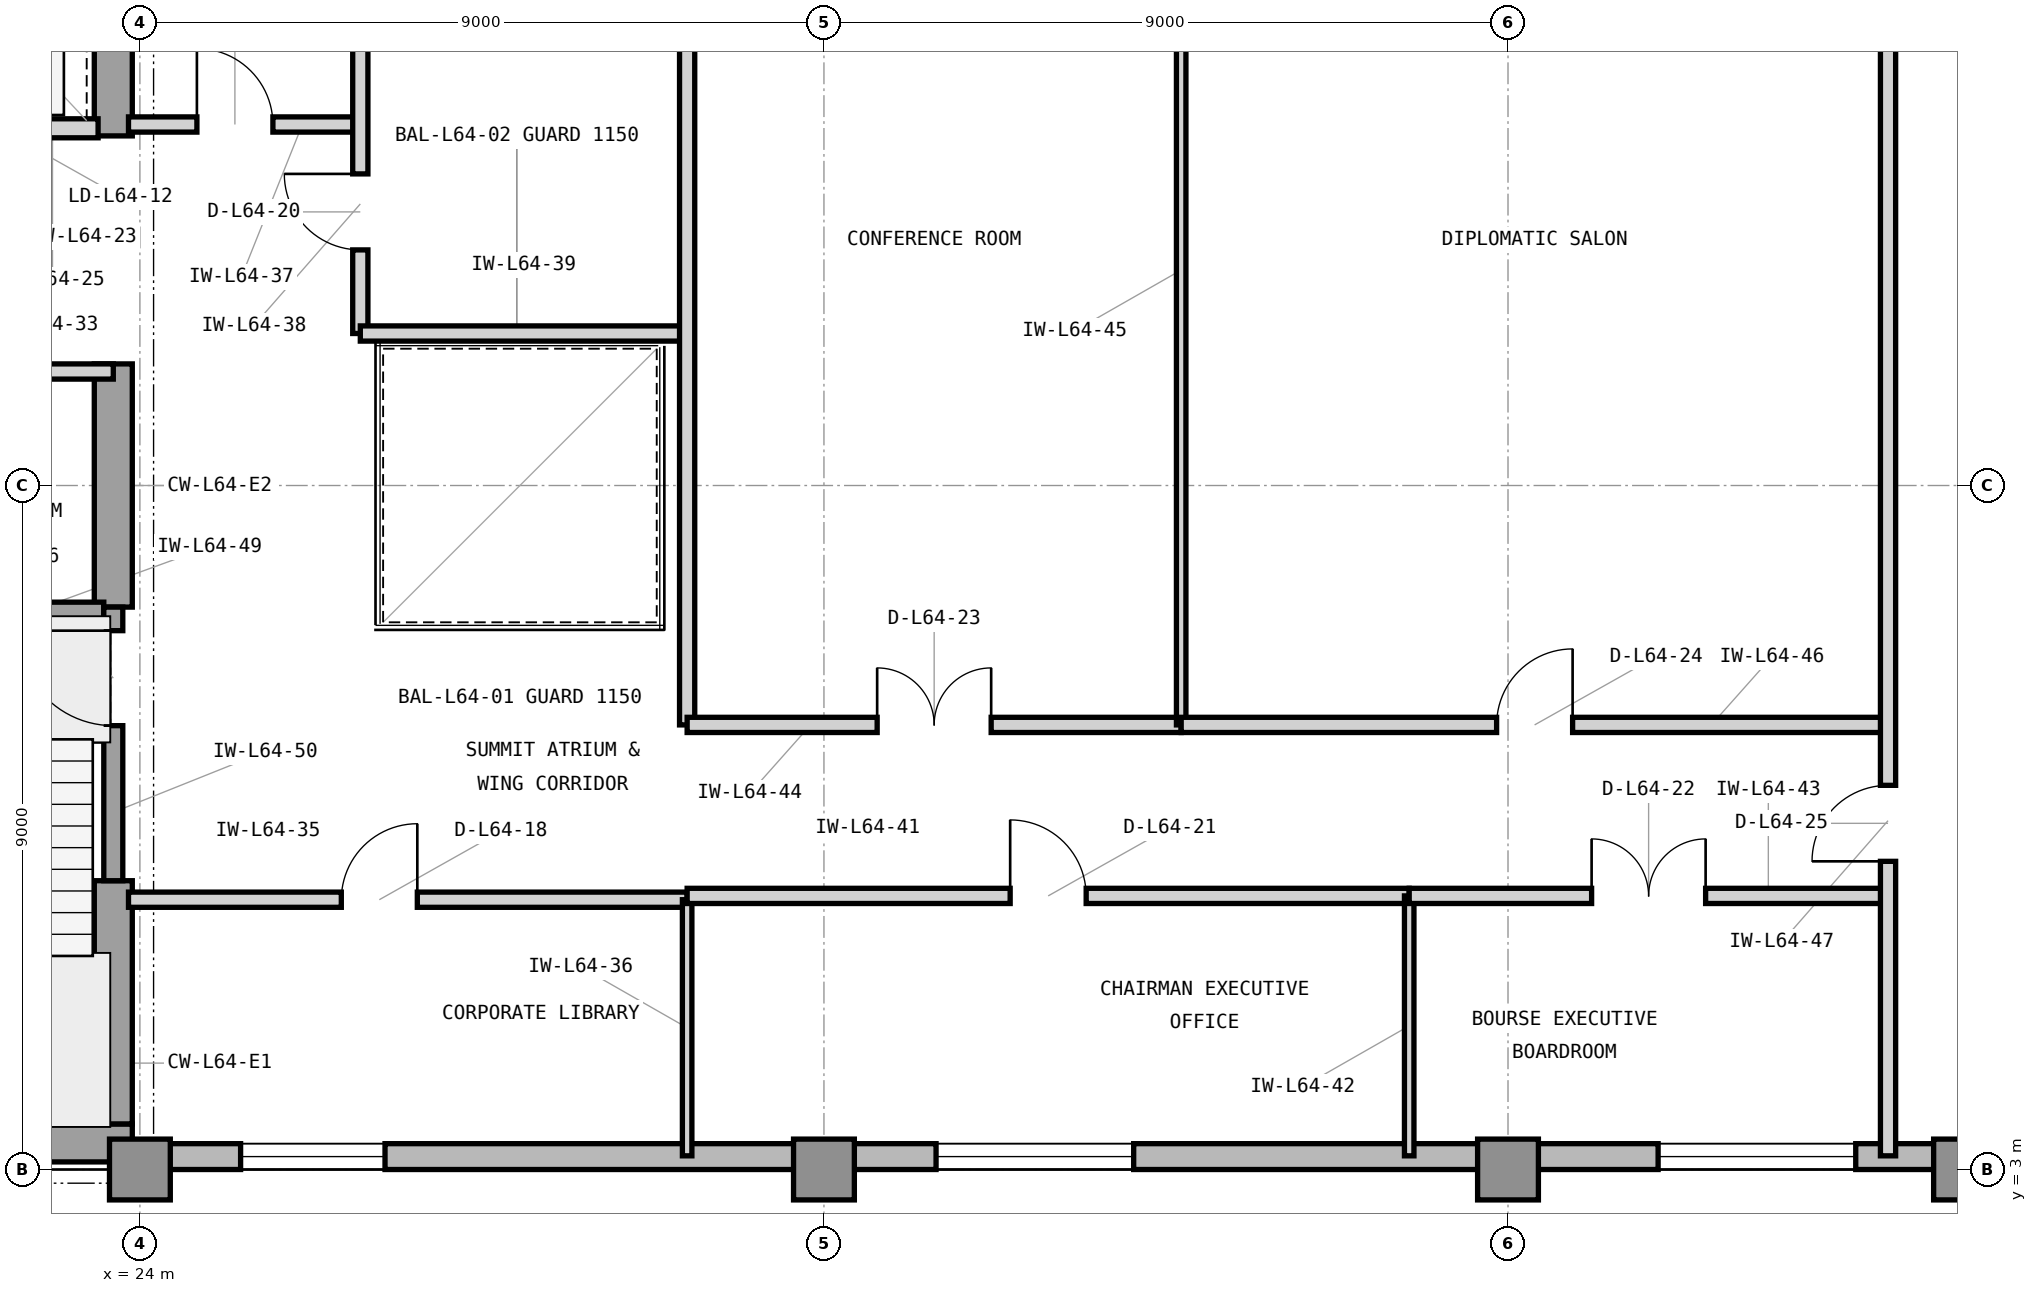
"""IFC4 building model, lengths in metres.
Left out: names, types, materials, properties, quantities, classifications, styles, units other than length and angle.
Written with IfcOpenShell. Run it as: python <this file> out.ifc"""

import sys

from ifc_helpers import new_model, si_unit, direction, frame, frame_2d, origin, origin_2d, place, context, subcontext, project, spatial, rectangle, extrude, element, fill, save


model = new_model("IFC4")
c1 = context("Model", 3, precision=1e-05, world=origin(), true_north=direction((0.0, 1.0)))
c2 = subcontext(c1, "Body", "Model", "MODEL_VIEW")
j1 = project(units=[si_unit("LENGTHUNIT", "METRE"), si_unit("PLANEANGLEUNIT", "RADIAN")], contexts=[c1])
p1 = place(None, origin())
s1 = spatial("IfcSite", under=j1, at=p1, CompositionType="ELEMENT")
p2 = place(p1, origin())
s2 = spatial("IfcBuilding", under=s1, at=p2, CompositionType="ELEMENT")
p3 = place(p2, frame((0.0, 0.0, 262.5)))
s3 = spatial("IfcBuildingStorey", under=s2, at=p3, CompositionType="ELEMENT", Elevation=262.5)
p4 = place(p3, frame((7.475, 3.35, 0.0), z_axis=(0.0, 0.0, 1.0), x_axis=(1.0, 0.0, 0.0)))
e1 = element("IfcWall", 1, at=p4, inside=s3, PredefinedType="SHEAR", context=c2, shape_type="SweptSolid", body=[
    extrude(rectangle(XDim=16.425, YDim=0.5, at=frame_2d((8.212, 0.0))), origin(), (0.0, 0.0, 1.0), 3.9),
])
p5 = place(p3, frame((23.65, 3.6, 0.0), z_axis=(0.0, 0.0, 1.0), x_axis=(0.0, 1.0, 0.0)))
e2 = element("IfcWall", 2, at=p5, inside=s3, PredefinedType="SHEAR", context=c2, shape_type="SweptSolid", body=[
    extrude(rectangle(XDim=3.2, YDim=0.5, at=frame_2d((1.6, 0.0))), origin(), (0.0, 0.0, 1.0), 3.9),
])
p6 = place(p3, frame((23.65, 10.4, 0.0), z_axis=(0.0, 0.0, 1.0), x_axis=(0.0, 1.0, 0.0)))
e3 = element("IfcWall", 3, at=p6, inside=s3, PredefinedType="SHEAR", context=c2, shape_type="SweptSolid", body=[
    extrude(rectangle(XDim=3.2, YDim=0.5, at=frame_2d((1.6, 0.0))), origin(), (0.0, 0.0, 1.0), 3.9),
])
p7 = place(p3, frame((23.65, 16.6, 0.0), z_axis=(0.0, 0.0, 1.0), x_axis=(0.0, 1.0, 0.0)))
e4 = element("IfcWall", 4, at=p7, inside=s3, PredefinedType="SHEAR", context=c2, shape_type="SweptSolid", body=[
    extrude(rectangle(XDim=4.05, YDim=0.5, at=frame_2d((2.025, 0.0))), origin(), (0.0, 0.0, 1.0), 3.9),
])
for number, where, z_axis, x_axis in (
    (5, (24.0, 3.0, 0.0), (0.0, 0.0, 1.0), (1.0, 0.0, 0.0)),
    (6, (33.0, 3.0, 0.0), (0.0, 0.0, 1.0), (1.0, 0.0, 0.0)),
    (7, (42.0, 3.0, 0.0), (0.0, 0.0, 1.0), (1.0, 0.0, 0.0)),
    (8, (48.0, 3.0, 0.0), (0.0, 0.0, 1.0), (1.0, 0.0, 0.0)),
):
    element("IfcColumn", number, at=place(p3, frame(where, z_axis=z_axis, x_axis=x_axis)), inside=s3, PredefinedType="COLUMN", context=c2, shape_type="SweptSolid", body=[
        extrude(rectangle(XDim=0.8, YDim=0.8, at=origin_2d()), origin(), (0.0, 0.0, 1.0), 3.9),
    ])
p8 = place(p3, frame((23.9, 3.17, 0.0), z_axis=(0.0, 0.0, 1.0), x_axis=(1.0, 0.0, 0.0)))
e9 = element("IfcWall", 9, at=p8, inside=s3, PredefinedType="STANDARD", context=c2, shape_type="SweptSolid", body=[
    extrude(rectangle(XDim=28.5, YDim=0.34, at=frame_2d((14.25, 0.0))), origin(), (0.0, 0.0, 1.0), 3.715),
])
p9 = place(p8, frame((1.425, 0.0, 0.8)))
e10 = element("IfcOpeningElement", 10, at=p9, cuts=e9, PredefinedType="OPENING", context=c2, shape_type="SweptSolid", body=[
    extrude(rectangle(XDim=1.9, YDim=2.35, at=frame_2d((0.95, 1.175))), frame((0.0, 0.18, 0.0), z_axis=(0.0, -1.0, 0.0), x_axis=(1.0, 0.0, 0.0)), (0.0, 0.0, 1.0), 0.36),
])
p10 = place(p8, frame((10.575, 0.0, 0.8)))
e11 = element("IfcOpeningElement", 11, at=p10, cuts=e9, PredefinedType="OPENING", context=c2, shape_type="SweptSolid", body=[
    extrude(rectangle(XDim=2.6, YDim=2.35, at=frame_2d((1.3, 1.175))), frame((0.0, 0.18, 0.0), z_axis=(0.0, -1.0, 0.0), x_axis=(1.0, 0.0, 0.0)), (0.0, 0.0, 1.0), 0.36),
])
p11 = place(p8, frame((20.075, 0.0, 0.8)))
e12 = element("IfcOpeningElement", 12, at=p11, cuts=e9, PredefinedType="OPENING", context=c2, shape_type="SweptSolid", body=[
    extrude(rectangle(XDim=2.6, YDim=2.35, at=frame_2d((1.3, 1.175))), frame((0.0, 0.18, 0.0), z_axis=(0.0, -1.0, 0.0), x_axis=(1.0, 0.0, 0.0)), (0.0, 0.0, 1.0), 0.36),
])
p12 = place(p3, frame((21.05, 16.7, 0.0), z_axis=(0.0, 0.0, 1.0), x_axis=(1.0, 0.0, 0.0)))
e13 = element("IfcWall", 13, at=p12, inside=s3, PredefinedType="PARTITIONING", context=c2, shape_type="SweptSolid", body=[
    extrude(rectangle(XDim=2.4, YDim=0.25, at=frame_2d((1.2, 0.0))), origin(), (0.0, 0.0, 1.0), 3.088),
])
p13 = place(p12, frame((0.52, 0.0, 0.0)))
e14 = element("IfcOpeningElement", 14, at=p13, cuts=e13, PredefinedType="OPENING", context=c2, shape_type="SweptSolid", body=[
    extrude(rectangle(XDim=1.15, YDim=2.25, at=frame_2d((0.575, 1.125))), frame((0.0, 0.135, 0.0), z_axis=(0.0, -1.0, 0.0), x_axis=(1.0, 0.0, 0.0)), (0.0, 0.0, 1.0), 0.27),
])
p14 = place(p3, frame((18.5, 13.5, 0.0), z_axis=(0.0, 0.0, 1.0), x_axis=(1.0, 0.0, 0.0)))
e15 = element("IfcWall", 15, at=p14, inside=s3, PredefinedType="PARTITIONING", context=c2, shape_type="SweptSolid", body=[
    extrude(rectangle(XDim=5.15, YDim=0.2, at=frame_2d((2.575, 0.0))), origin(), (0.0, 0.0, 1.0), 3.088),
])
p15 = place(p14, frame((2.1, 0.0, 0.0)))
e16 = element("IfcOpeningElement", 16, at=p15, cuts=e15, PredefinedType="OPENING", context=c2, shape_type="SweptSolid", body=[
    extrude(rectangle(XDim=0.95, YDim=2.1, at=frame_2d((0.475, 1.05))), frame((0.0, 0.11, 0.0), z_axis=(0.0, -1.0, 0.0), x_axis=(1.0, 0.0, 0.0)), (0.0, 0.0, 1.0), 0.22),
])
p16 = place(p3, frame((23.85, 6.55, 0.0), z_axis=(0.0, 0.0, 1.0), x_axis=(1.0, 0.0, 0.0)))
e17 = element("IfcWall", 17, at=p16, inside=s3, PredefinedType="PARTITIONING", context=c2, shape_type="SweptSolid", body=[
    extrude(rectangle(XDim=7.35, YDim=0.2, at=frame_2d((3.675, 0.0))), origin(), (0.0, 0.0, 1.0), 3.705),
])
p17 = place(p16, frame((2.8, 0.0, 0.0)))
e18 = element("IfcOpeningElement", 18, at=p17, cuts=e17, PredefinedType="OPENING", context=c2, shape_type="SweptSolid", body=[
    extrude(rectangle(XDim=1.0, YDim=2.15, at=frame_2d((0.5, 1.075))), frame((0.0, 0.11, 0.0), z_axis=(0.0, -1.0, 0.0), x_axis=(1.0, 0.0, 0.0)), (0.0, 0.0, 1.0), 0.22),
])
p18 = place(p3, frame((31.2, 3.18, 0.0), z_axis=(0.0, 0.0, 1.0), x_axis=(0.0, 1.0, 0.0)))
e19 = element("IfcWall", 19, at=p18, inside=s3, PredefinedType="PARTITIONING", context=c2, shape_type="SweptSolid", body=[
    extrude(rectangle(XDim=3.37, YDim=0.125, at=frame_2d((1.685, 0.0))), origin(), (0.0, 0.0, 1.0), 3.705),
])
p19 = place(p3, frame((23.85, 16.75, 0.0), z_axis=(0.0, 0.0, 1.0), x_axis=(1.0, 0.0, 0.0)))
e20 = element("IfcWall", 20, at=p19, inside=s3, PredefinedType="PARTITIONING", context=c2, shape_type="SweptSolid", body=[
    extrude(rectangle(XDim=3.05, YDim=0.2, at=frame_2d((1.525, 0.0))), origin(), (0.0, 0.0, 1.0), 3.705),
])
p20 = place(p19, frame((0.9, 0.0, 0.0)))
e21 = element("IfcOpeningElement", 21, at=p20, cuts=e20, PredefinedType="OPENING", context=c2, shape_type="SweptSolid", body=[
    extrude(rectangle(XDim=1.0, YDim=2.15, at=frame_2d((0.5, 1.075))), frame((0.0, 0.11, 0.0), z_axis=(0.0, -1.0, 0.0), x_axis=(1.0, 0.0, 0.0)), (0.0, 0.0, 1.0), 0.22),
])
p21 = place(p3, frame((26.9, 14.0, 0.0), z_axis=(0.0, 0.0, 1.0), x_axis=(0.0, 1.0, 0.0)))
e22 = element("IfcWall", 22, at=p21, inside=s3, PredefinedType="PARTITIONING", context=c2, shape_type="SweptSolid", body=[
    extrude(rectangle(XDim=6.82, YDim=0.2, at=frame_2d((3.41, 0.0))), origin(), (0.0, 0.0, 1.0), 3.705),
])
p22 = place(p21, frame((1.1, 0.0, 0.0)))
e23 = element("IfcOpeningElement", 23, at=p22, cuts=e22, PredefinedType="OPENING", context=c2, shape_type="SweptSolid", body=[
    extrude(rectangle(XDim=1.0, YDim=2.15, at=frame_2d((0.5, 1.075))), frame((0.0, 0.11, 0.0), z_axis=(0.0, -1.0, 0.0), x_axis=(1.0, 0.0, 0.0)), (0.0, 0.0, 1.0), 0.22),
])
p23 = place(p3, frame((26.9, 14.0, 0.0), z_axis=(0.0, 0.0, 1.0), x_axis=(1.0, 0.0, 0.0)))
e24 = element("IfcWall", 24, at=p23, inside=s3, PredefinedType="PARTITIONING", context=c2, shape_type="SweptSolid", body=[
    extrude(rectangle(XDim=4.3, YDim=0.2, at=frame_2d((2.15, 0.0))), origin(), (0.0, 0.0, 1.0), 3.705),
])
p24 = place(p3, frame((31.2, 8.85, 0.0), z_axis=(0.0, 0.0, 1.0), x_axis=(0.0, 1.0, 0.0)))
e25 = element("IfcWall", 25, at=p24, inside=s3, PredefinedType="PARTITIONING", context=c2, shape_type="SweptSolid", body=[
    extrude(rectangle(XDim=11.97, YDim=0.2, at=frame_2d((5.985, 0.0))), origin(), (0.0, 0.0, 1.0), 3.705),
])
p25 = place(p3, frame((31.2, 6.6, 0.0), z_axis=(0.0, 0.0, 1.0), x_axis=(1.0, 0.0, 0.0)))
e26 = element("IfcWall", 26, at=p25, inside=s3, PredefinedType="PARTITIONING", context=c2, shape_type="SweptSolid", body=[
    extrude(rectangle(XDim=9.5, YDim=0.2, at=frame_2d((4.75, 0.0))), origin(), (0.0, 0.0, 1.0), 3.705),
])
p26 = place(p25, frame((4.25, 0.0, 0.0)))
e27 = element("IfcOpeningElement", 27, at=p26, cuts=e26, PredefinedType="OPENING", context=c2, shape_type="SweptSolid", body=[
    extrude(rectangle(XDim=1.0, YDim=2.15, at=frame_2d((0.5, 1.075))), frame((0.0, 0.11, 0.0), z_axis=(0.0, -1.0, 0.0), x_axis=(1.0, 0.0, 0.0)), (0.0, 0.0, 1.0), 0.22),
])
p27 = place(p3, frame((40.7, 3.18, 0.0), z_axis=(0.0, 0.0, 1.0), x_axis=(0.0, 1.0, 0.0)))
e28 = element("IfcWall", 28, at=p27, inside=s3, PredefinedType="PARTITIONING", context=c2, shape_type="SweptSolid", body=[
    extrude(rectangle(XDim=3.42, YDim=0.125, at=frame_2d((1.71, 0.0))), origin(), (0.0, 0.0, 1.0), 3.705),
])
p28 = place(p3, frame((40.7, 6.6, 0.0), z_axis=(0.0, 0.0, 1.0), x_axis=(1.0, 0.0, 0.0)))
e29 = element("IfcWall", 29, at=p28, inside=s3, PredefinedType="PARTITIONING", context=c2, shape_type="SweptSolid", body=[
    extrude(rectangle(XDim=6.3, YDim=0.2, at=frame_2d((3.15, 0.0))), origin(), (0.0, 0.0, 1.0), 3.705),
])
p29 = place(p28, frame((2.4, 0.0, 0.0)))
e30 = element("IfcOpeningElement", 30, at=p29, cuts=e29, PredefinedType="OPENING", context=c2, shape_type="SweptSolid", body=[
    extrude(rectangle(XDim=1.5, YDim=2.3, at=frame_2d((0.75, 1.15))), frame((0.0, 0.11, 0.0), z_axis=(0.0, -1.0, 0.0), x_axis=(1.0, 0.0, 0.0)), (0.0, 0.0, 1.0), 0.22),
])
p30 = place(p3, frame((31.2, 8.85, 0.0), z_axis=(0.0, 0.0, 1.0), x_axis=(1.0, 0.0, 0.0)))
e31 = element("IfcWall", 31, at=p30, inside=s3, PredefinedType="PARTITIONING", context=c2, shape_type="SweptSolid", body=[
    extrude(rectangle(XDim=6.5, YDim=0.2, at=frame_2d((3.25, 0.0))), origin(), (0.0, 0.0, 1.0), 3.705),
])
p31 = place(p30, frame((2.5, 0.0, 0.0)))
e32 = element("IfcOpeningElement", 32, at=p31, cuts=e31, PredefinedType="OPENING", context=c2, shape_type="SweptSolid", body=[
    extrude(rectangle(XDim=1.5, YDim=2.3, at=frame_2d((0.75, 1.15))), frame((0.0, 0.11, 0.0), z_axis=(0.0, -1.0, 0.0), x_axis=(1.0, 0.0, 0.0)), (0.0, 0.0, 1.0), 0.22),
])
p32 = place(p3, frame((37.7, 8.85, 0.0), z_axis=(0.0, 0.0, 1.0), x_axis=(0.0, 1.0, 0.0)))
e33 = element("IfcWall", 33, at=p32, inside=s3, PredefinedType="PARTITIONING", context=c2, shape_type="SweptSolid", body=[
    extrude(rectangle(XDim=11.97, YDim=0.125, at=frame_2d((5.985, 0.0))), origin(), (0.0, 0.0, 1.0), 3.705),
])
p33 = place(p3, frame((37.7, 8.85, 0.0), z_axis=(0.0, 0.0, 1.0), x_axis=(1.0, 0.0, 0.0)))
e34 = element("IfcWall", 34, at=p33, inside=s3, PredefinedType="PARTITIONING", context=c2, shape_type="SweptSolid", body=[
    extrude(rectangle(XDim=9.3, YDim=0.2, at=frame_2d((4.65, 0.0))), origin(), (0.0, 0.0, 1.0), 3.705),
])
p34 = place(p33, frame((4.15, 0.0, 0.0)))
e35 = element("IfcOpeningElement", 35, at=p34, cuts=e34, PredefinedType="OPENING", context=c2, shape_type="SweptSolid", body=[
    extrude(rectangle(XDim=1.0, YDim=2.15, at=frame_2d((0.5, 1.075))), frame((0.0, 0.11, 0.0), z_axis=(0.0, -1.0, 0.0), x_axis=(1.0, 0.0, 0.0)), (0.0, 0.0, 1.0), 0.22),
])
p35 = place(p3, frame((47.0, 3.18, 0.0), z_axis=(0.0, 0.0, 1.0), x_axis=(0.0, 1.0, 0.0)))
e36 = element("IfcWall", 36, at=p35, inside=s3, PredefinedType="PARTITIONING", context=c2, shape_type="SweptSolid", body=[
    extrude(rectangle(XDim=17.64, YDim=0.2, at=frame_2d((8.82, 0.0))), origin(), (0.0, 0.0, 1.0), 3.705),
])
p36 = place(p35, frame((3.875, 0.0, 0.0)))
e37 = element("IfcOpeningElement", 37, at=p36, cuts=e36, PredefinedType="OPENING", context=c2, shape_type="SweptSolid", body=[
    extrude(rectangle(XDim=1.0, YDim=2.15, at=frame_2d((0.5, 1.075))), frame((0.0, 0.11, 0.0), z_axis=(0.0, -1.0, 0.0), x_axis=(1.0, 0.0, 0.0)), (0.0, 0.0, 1.0), 0.22),
])
p37 = place(p3, frame((19.705, 10.34, 0.0), z_axis=(0.0, 0.0, 1.0), x_axis=(1.0, 0.0, 0.0)))
e38 = element("IfcWall", 38, at=p37, inside=s3, PredefinedType="SHEAR", context=c2, shape_type="SweptSolid", body=[
    extrude(rectangle(XDim=3.82, YDim=0.25, at=frame_2d((1.91, 0.0))), origin(), (0.0, 0.0, 1.0), 3.9),
])
p38 = place(p3, frame((23.65, 6.8, 0.0), z_axis=(0.0, 0.0, 1.0), x_axis=(0.0, 1.0, 0.0)))
e39 = element("IfcWall", 39, at=p38, inside=s3, PredefinedType="SHEAR", context=c2, shape_type="SweptSolid", body=[
    extrude(rectangle(XDim=3.6, YDim=0.25, at=frame_2d((1.8, 0.0))), origin(), (0.0, 0.0, 1.0), 3.9),
])
p39 = place(p38, frame((2.04, 0.0, 0.0)))
e40 = element("IfcOpeningElement", 40, at=p39, cuts=e39, PredefinedType="OPENING", context=c2, shape_type="SweptSolid", body=[
    extrude(rectangle(XDim=1.25, YDim=2.2, at=frame_2d((0.625, 1.1))), frame((0.0, 0.135, 0.0), z_axis=(0.0, -1.0, 0.0), x_axis=(1.0, 0.0, 0.0)), (0.0, 0.0, 1.0), 0.27),
])
p40 = place(p9, origin())
e41 = element("IfcWindow", 41, at=p40, inside=s3, PartitioningType="SINGLE_PANEL", PredefinedType="WINDOW", context=c2, shape_type="SweptSolid", body=[
    extrude(rectangle(XDim=1.9, YDim=2.35, at=frame_2d((0.95, 1.175))), frame((0.0, 0.11, 0.0), z_axis=(0.0, -1.0, 0.0), x_axis=(1.0, 0.0, 0.0)), (0.0, 0.0, 1.0), 0.06),
])
fill(e10, e41)
p41 = place(p10, origin())
e42 = element("IfcWindow", 42, at=p41, inside=s3, PartitioningType="SINGLE_PANEL", PredefinedType="WINDOW", context=c2, shape_type="SweptSolid", body=[
    extrude(rectangle(XDim=2.6, YDim=2.35, at=frame_2d((1.3, 1.175))), frame((0.0, 0.11, 0.0), z_axis=(0.0, -1.0, 0.0), x_axis=(1.0, 0.0, 0.0)), (0.0, 0.0, 1.0), 0.06),
])
fill(e11, e42)
p42 = place(p11, origin())
e43 = element("IfcWindow", 43, at=p42, inside=s3, PartitioningType="SINGLE_PANEL", PredefinedType="WINDOW", context=c2, shape_type="SweptSolid", body=[
    extrude(rectangle(XDim=2.6, YDim=2.35, at=frame_2d((1.3, 1.175))), frame((0.0, 0.11, 0.0), z_axis=(0.0, -1.0, 0.0), x_axis=(1.0, 0.0, 0.0)), (0.0, 0.0, 1.0), 0.06),
])
fill(e12, e43)
p43 = place(p17, origin())
e44 = element("IfcDoor", 44, at=p43, inside=s3, OperationType="SINGLE_SWING_RIGHT", PredefinedType="DOOR", context=c2, shape_type="SweptSolid", body=[
    extrude(rectangle(XDim=1.0, YDim=2.15, at=frame_2d((0.5, 1.075))), frame((0.0, 0.025, 0.0), z_axis=(0.0, -1.0, 0.0), x_axis=(1.0, 0.0, 0.0)), (0.0, 0.0, 1.0), 0.05),
])
fill(e18, e44)
p44 = place(p20, origin())
e45 = element("IfcDoor", 45, at=p44, inside=s3, OperationType="SINGLE_SWING_LEFT", PredefinedType="DOOR", context=c2, shape_type="SweptSolid", body=[
    extrude(rectangle(XDim=1.0, YDim=2.15, at=frame_2d((0.5, 1.075))), frame((0.0, 0.025, 0.0), z_axis=(0.0, -1.0, 0.0), x_axis=(1.0, 0.0, 0.0)), (0.0, 0.0, 1.0), 0.05),
])
fill(e21, e45)
p45 = place(p22, origin())
e46 = element("IfcDoor", 46, at=p45, inside=s3, OperationType="SINGLE_SWING_RIGHT", PredefinedType="DOOR", context=c2, shape_type="SweptSolid", body=[
    extrude(rectangle(XDim=1.0, YDim=2.15, at=frame_2d((0.5, 1.075))), frame((0.0, 0.025, 0.0), z_axis=(0.0, -1.0, 0.0), x_axis=(1.0, 0.0, 0.0)), (0.0, 0.0, 1.0), 0.05),
])
fill(e23, e46)
p46 = place(p26, origin())
e47 = element("IfcDoor", 47, at=p46, inside=s3, OperationType="SINGLE_SWING_LEFT", PredefinedType="DOOR", context=c2, shape_type="SweptSolid", body=[
    extrude(rectangle(XDim=1.0, YDim=2.15, at=frame_2d((0.5, 1.075))), frame((0.0, 0.025, 0.0), z_axis=(0.0, -1.0, 0.0), x_axis=(1.0, 0.0, 0.0)), (0.0, 0.0, 1.0), 0.05),
])
fill(e27, e47)
p47 = place(p29, origin())
e48 = element("IfcDoor", 48, at=p47, inside=s3, OperationType="DOUBLE_DOOR_SINGLE_SWING", PredefinedType="DOOR", context=c2, shape_type="SweptSolid", body=[
    extrude(rectangle(XDim=1.5, YDim=2.3, at=frame_2d((0.75, 1.15))), frame((0.0, 0.025, 0.0), z_axis=(0.0, -1.0, 0.0), x_axis=(1.0, 0.0, 0.0)), (0.0, 0.0, 1.0), 0.05),
])
fill(e30, e48)
p48 = place(p31, origin())
e49 = element("IfcDoor", 49, at=p48, inside=s3, OperationType="DOUBLE_DOOR_SINGLE_SWING", PredefinedType="DOOR", context=c2, shape_type="SweptSolid", body=[
    extrude(rectangle(XDim=1.5, YDim=2.3, at=frame_2d((0.75, 1.15))), frame((0.0, 0.025, 0.0), z_axis=(0.0, -1.0, 0.0), x_axis=(1.0, 0.0, 0.0)), (0.0, 0.0, 1.0), 0.05),
])
fill(e32, e49)
p49 = place(p34, origin())
e50 = element("IfcDoor", 50, at=p49, inside=s3, OperationType="SINGLE_SWING_RIGHT", PredefinedType="DOOR", context=c2, shape_type="SweptSolid", body=[
    extrude(rectangle(XDim=1.0, YDim=2.15, at=frame_2d((0.5, 1.075))), frame((0.0, 0.025, 0.0), z_axis=(0.0, -1.0, 0.0), x_axis=(1.0, 0.0, 0.0)), (0.0, 0.0, 1.0), 0.05),
])
fill(e35, e50)
p50 = place(p36, origin())
e51 = element("IfcDoor", 51, at=p50, inside=s3, OperationType="SINGLE_SWING_LEFT", PredefinedType="DOOR", context=c2, shape_type="SweptSolid", body=[
    extrude(rectangle(XDim=1.0, YDim=2.15, at=frame_2d((0.5, 1.075))), frame((0.0, 0.025, 0.0), z_axis=(0.0, -1.0, 0.0), x_axis=(1.0, 0.0, 0.0)), (0.0, 0.0, 1.0), 0.05),
])
fill(e37, e51)
p51 = place(p39, origin())
e52 = element("IfcDoor", 52, at=p51, inside=s3, OperationType="SINGLE_SWING_RIGHT", PredefinedType="DOOR", context=c2, shape_type="SweptSolid", body=[
    extrude(rectangle(XDim=1.25, YDim=2.2, at=frame_2d((0.625, 1.1))), frame((0.0, 0.025, 0.0), z_axis=(0.0, -1.0, 0.0), x_axis=(1.0, 0.0, 0.0)), (0.0, 0.0, 1.0), 0.05),
])
fill(e40, e52)
save(model, sys.argv[1])
